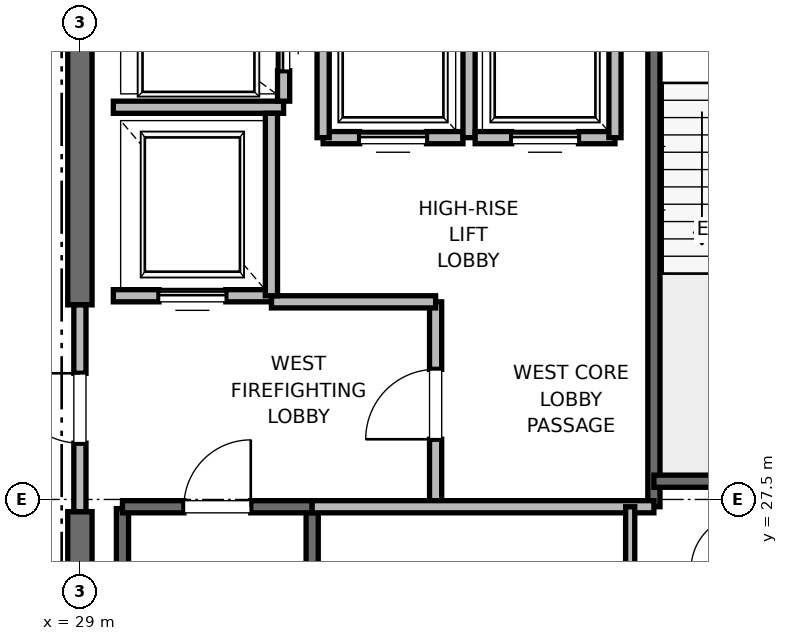
"""IFC4 building model, lengths in metres.
Left out: names, types, materials, properties, quantities, classifications, styles, units other than length and angle.
Written with IfcOpenShell. Run it as: python <this file> out.ifc"""

import sys

from ifc_helpers import new_model, si_unit, direction, frame, frame_2d, origin, place, context, subcontext, project, spatial, rectangle, extrude, element, fill, save


model = new_model("IFC4")
c1 = context("Model", 3, precision=1e-05, world=origin(), true_north=direction((0.0, 1.0)))
c2 = subcontext(c1, "Body", "Model", "MODEL_VIEW")
j1 = project(units=[si_unit("LENGTHUNIT", "METRE"), si_unit("PLANEANGLEUNIT", "RADIAN")], contexts=[c1])
p1 = place(None, origin())
s1 = spatial("IfcSite", under=j1, at=p1, CompositionType="ELEMENT")
p2 = place(p1, origin())
s2 = spatial("IfcBuilding", under=s1, at=p2, CompositionType="ELEMENT")
p3 = place(p2, frame((0.0, 0.0, 314.8)))
s3 = spatial("IfcBuildingStorey", under=s2, at=p3, CompositionType="ELEMENT", Elevation=314.8)
p4 = place(p3, frame((29.0, 18.5, 0.0), z_axis=(0.0, 0.0, 1.0), x_axis=(0.0, 1.0, 0.0)))
e1 = element("IfcWall", 1, at=p4, inside=s3, PredefinedType="SHEAR", context=c2, shape_type="SweptSolid", body=[
    extrude(rectangle(XDim=8.8, YDim=0.4, at=frame_2d((4.4, 0.0))), origin(), (0.0, 0.0, 1.0), 3.785),
])
p5 = place(p3, frame((29.0, 30.7, 0.0), z_axis=(0.0, 0.0, 1.0), x_axis=(0.0, 1.0, 0.0)))
e2 = element("IfcWall", 2, at=p5, inside=s3, PredefinedType="SHEAR", context=c2, shape_type="SweptSolid", body=[
    extrude(rectangle(XDim=5.8, YDim=0.4, at=frame_2d((2.9, 0.0))), origin(), (0.0, 0.0, 1.0), 3.785),
])
p6 = place(p3, frame((29.7, 19.2, 0.0), z_axis=(0.0, 0.0, 1.0), x_axis=(0.0, 1.0, 0.0)))
e3 = element("IfcWall", 3, at=p6, inside=s3, PredefinedType="SOLIDWALL", context=c2, shape_type="SweptSolid", body=[
    extrude(rectangle(XDim=8.15, YDim=0.2, at=frame_2d((4.075, 0.0))), origin(), (0.0, 0.0, 1.0), 3.785),
])
p7 = place(p3, frame((32.82, 18.6, 0.0), z_axis=(0.0, 0.0, 1.0), x_axis=(0.0, 1.0, 0.0)))
e4 = element("IfcWall", 4, at=p7, inside=s3, PredefinedType="SOLIDWALL", context=c2, shape_type="SweptSolid", body=[
    extrude(rectangle(XDim=8.78, YDim=0.2, at=frame_2d((4.39, 0.0))), origin(), (0.0, 0.0, 1.0), 3.785),
])
p8 = place(p3, frame((29.7, 27.38, 0.0), z_axis=(0.0, 0.0, 1.0), x_axis=(1.0, 0.0, 0.0)))
e5 = element("IfcWall", 5, at=p8, inside=s3, PredefinedType="SOLIDWALL", context=c2, shape_type="SweptSolid", body=[
    extrude(rectangle(XDim=3.12, YDim=0.2, at=frame_2d((1.56, 0.0))), origin(), (0.0, 0.0, 1.0), 3.785),
])
p9 = place(p8, frame((1.01, 0.0, 0.0)))
e6 = element("IfcOpeningElement", 6, at=p9, cuts=e5, PredefinedType="OPENING", context=c2, shape_type="SweptSolid", body=[
    extrude(rectangle(XDim=1.1, YDim=2.15, at=frame_2d((0.55, 1.075))), frame((0.0, 0.1, 0.0), z_axis=(0.0, -1.0, 0.0), x_axis=(1.0, 0.0, 0.0)), (0.0, 0.0, 1.0), 0.2),
])
p10 = place(p3, frame((38.44, 27.38, 0.0), z_axis=(0.0, 0.0, 1.0), x_axis=(0.0, 1.0, 0.0)))
e7 = element("IfcWall", 7, at=p10, inside=s3, PredefinedType="SOLIDWALL", context=c2, shape_type="SweptSolid", body=[
    extrude(rectangle(XDim=8.87, YDim=0.2, at=frame_2d((4.435, 0.0))), origin(), (0.0, 0.0, 1.0), 3.785),
])
p11 = place(p3, frame((38.44, 27.8, 0.0), z_axis=(0.0, 0.0, 1.0), x_axis=(1.0, 0.0, 0.0)))
e8 = element("IfcWall", 8, at=p11, inside=s3, PredefinedType="SOLIDWALL", context=c2, shape_type="SweptSolid", body=[
    extrude(rectangle(XDim=3.32, YDim=0.2, at=frame_2d((1.66, 0.0))), origin(), (0.0, 0.0, 1.0), 3.785),
])
p12 = place(p3, frame((34.85, 27.38, 0.0), z_axis=(0.0, 0.0, 1.0), x_axis=(0.0, 1.0, 0.0)))
e9 = element("IfcWall", 9, at=p12, inside=s3, PredefinedType="PARTITIONING", context=c2, shape_type="SweptSolid", body=[
    extrude(rectangle(XDim=3.37, YDim=0.2, at=frame_2d((1.685, 0.0))), origin(), (0.0, 0.0, 1.0), 3.785),
])
p13 = place(p12, frame((1.11, 0.0, 0.0)))
e10 = element("IfcOpeningElement", 10, at=p13, cuts=e9, PredefinedType="OPENING", context=c2, shape_type="SweptSolid", body=[
    extrude(rectangle(XDim=1.15, YDim=2.2, at=frame_2d((0.575, 1.1))), frame((0.0, 0.1, 0.0), z_axis=(0.0, -1.0, 0.0), x_axis=(1.0, 0.0, 0.0)), (0.0, 0.0, 1.0), 0.2),
])
p14 = place(p3, frame((29.0, 27.3, 0.0), z_axis=(0.0, 0.0, 1.0), x_axis=(0.0, 1.0, 0.0)))
e11 = element("IfcWall", 11, at=p14, inside=s3, PredefinedType="PARTITIONING", context=c2, shape_type="SweptSolid", body=[
    extrude(rectangle(XDim=3.4, YDim=0.2, at=frame_2d((1.7, 0.0))), origin(), (0.0, 0.0, 1.0), 2.865),
])
p15 = place(p14, frame((1.125, 0.0, 0.0)))
e12 = element("IfcOpeningElement", 12, at=p15, cuts=e11, PredefinedType="OPENING", context=c2, shape_type="SweptSolid", body=[
    extrude(rectangle(XDim=1.15, YDim=2.2, at=frame_2d((0.575, 1.1))), frame((0.0, 0.1, 0.0), z_axis=(0.0, -1.0, 0.0), x_axis=(1.0, 0.0, 0.0)), (0.0, 0.0, 1.0), 0.2),
])
p16 = place(p3, frame((32.82, 27.38, 0.0), z_axis=(0.0, 0.0, 1.0), x_axis=(1.0, 0.0, 0.0)))
e13 = element("IfcWall", 13, at=p16, inside=s3, PredefinedType="PARTITIONING", context=c2, shape_type="SweptSolid", body=[
    extrude(rectangle(XDim=5.62, YDim=0.2, at=frame_2d((2.81, 0.0))), origin(), (0.0, 0.0, 1.0), 3.785),
])
p17 = place(p3, frame((32.15, 30.75, 0.0), z_axis=(0.0, 0.0, 1.0), x_axis=(1.0, 0.0, 0.0)))
e14 = element("IfcWall", 14, at=p17, inside=s3, PredefinedType="PARTITIONING", context=c2, shape_type="SweptSolid", body=[
    extrude(rectangle(XDim=2.7, YDim=0.2, at=frame_2d((1.35, 0.0))), origin(), (0.0, 0.0, 1.0), 3.785),
])
p18 = place(p3, frame((29.55, 30.85, 0.0), z_axis=(0.0, 0.0, 1.0), x_axis=(1.0, 0.0, 0.0)))
e15 = element("IfcWall", 15, at=p18, inside=s3, PredefinedType="SOLIDWALL", context=c2, shape_type="SweptSolid", body=[
    extrude(rectangle(XDim=2.6, YDim=0.2, at=frame_2d((1.3, 0.0))), origin(), (0.0, 0.0, 1.0), 2.865),
])
p19 = place(p18, frame((0.75, 0.0, 0.0)))
e16 = element("IfcOpeningElement", 16, at=p19, cuts=e15, PredefinedType="OPENING", context=c2, shape_type="SweptSolid", body=[
    extrude(rectangle(XDim=1.1, YDim=2.2, at=frame_2d((0.55, 1.1))), frame((0.0, 0.1, 0.0), z_axis=(0.0, -1.0, 0.0), x_axis=(1.0, 0.0, 0.0)), (0.0, 0.0, 1.0), 0.2),
])
p20 = place(p3, frame((29.55, 33.95, 0.0), z_axis=(0.0, 0.0, 1.0), x_axis=(1.0, 0.0, 0.0)))
e17 = element("IfcWall", 17, at=p20, inside=s3, PredefinedType="SOLIDWALL", context=c2, shape_type="SweptSolid", body=[
    extrude(rectangle(XDim=2.8, YDim=0.2, at=frame_2d((1.4, 0.0))), origin(), (0.0, 0.0, 1.0), 3.785),
])
p21 = place(p3, frame((32.15, 30.85, 0.0), z_axis=(0.0, 0.0, 1.0), x_axis=(0.0, 1.0, 0.0)))
e18 = element("IfcWall", 18, at=p21, inside=s3, PredefinedType="SOLIDWALL", context=c2, shape_type="SweptSolid", body=[
    extrude(rectangle(XDim=3.0, YDim=0.2, at=frame_2d((1.5, 0.0))), origin(), (0.0, 0.0, 1.0), 3.785),
])
p22 = place(p3, frame((32.35, 34.05, 0.0), z_axis=(0.0, 0.0, 1.0), x_axis=(0.0, 1.0, 0.0)))
e19 = element("IfcWall", 19, at=p22, inside=s3, PredefinedType="SOLIDWALL", context=c2, shape_type="SweptSolid", body=[
    extrude(rectangle(XDim=2.1, YDim=0.2, at=frame_2d((1.05, 0.0))), origin(), (0.0, 0.0, 1.0), 3.785),
])
p23 = place(p22, frame((0.5, 0.0, 0.0)))
e20 = element("IfcOpeningElement", 20, at=p23, cuts=e19, PredefinedType="OPENING", context=c2, shape_type="SweptSolid", body=[
    extrude(rectangle(XDim=1.1, YDim=2.2, at=frame_2d((0.55, 1.1))), frame((0.0, 0.1, 0.0), z_axis=(0.0, -1.0, 0.0), x_axis=(1.0, 0.0, 0.0)), (0.0, 0.0, 1.0), 0.2),
])
p24 = place(p3, frame((33.0, 33.45, 0.0), z_axis=(0.0, 0.0, 1.0), x_axis=(1.0, 0.0, 0.0)))
e21 = element("IfcWall", 21, at=p24, inside=s3, PredefinedType="SOLIDWALL", context=c2, shape_type="SweptSolid", body=[
    extrude(rectangle(XDim=2.3, YDim=0.2, at=frame_2d((1.15, 0.0))), origin(), (0.0, 0.0, 1.0), 3.785),
])
p25 = place(p24, frame((0.6, 0.0, 0.0)))
e22 = element("IfcOpeningElement", 22, at=p25, cuts=e21, PredefinedType="OPENING", context=c2, shape_type="SweptSolid", body=[
    extrude(rectangle(XDim=1.1, YDim=2.2, at=frame_2d((0.55, 1.1))), frame((0.0, 0.1, 0.0), z_axis=(0.0, -1.0, 0.0), x_axis=(1.0, 0.0, 0.0)), (0.0, 0.0, 1.0), 0.2),
])
p26 = place(p3, frame((33.0, 36.05, 0.0), z_axis=(0.0, 0.0, 1.0), x_axis=(0.0, -1.0, 0.0)))
e23 = element("IfcWall", 23, at=p26, inside=s3, PredefinedType="SOLIDWALL", context=c2, shape_type="SweptSolid", body=[
    extrude(rectangle(XDim=2.6, YDim=0.2, at=frame_2d((1.3, 0.0))), origin(), (0.0, 0.0, 1.0), 3.785),
])
p27 = place(p3, frame((35.4, 33.45, 0.0), z_axis=(0.0, 0.0, 1.0), x_axis=(0.0, 1.0, 0.0)))
e24 = element("IfcWall", 24, at=p27, inside=s3, PredefinedType="SOLIDWALL", context=c2, shape_type="SweptSolid", body=[
    extrude(rectangle(XDim=2.6, YDim=0.2, at=frame_2d((1.3, 0.0))), origin(), (0.0, 0.0, 1.0), 2.865),
])
p28 = place(p3, frame((35.5, 33.45, 0.0), z_axis=(0.0, 0.0, 1.0), x_axis=(1.0, 0.0, 0.0)))
e25 = element("IfcWall", 25, at=p28, inside=s3, PredefinedType="SOLIDWALL", context=c2, shape_type="SweptSolid", body=[
    extrude(rectangle(XDim=2.3, YDim=0.2, at=frame_2d((1.15, 0.0))), origin(), (0.0, 0.0, 1.0), 3.785),
])
p29 = place(p28, frame((0.6, 0.0, 0.0)))
e26 = element("IfcOpeningElement", 26, at=p29, cuts=e25, PredefinedType="OPENING", context=c2, shape_type="SweptSolid", body=[
    extrude(rectangle(XDim=1.1, YDim=2.2, at=frame_2d((0.55, 1.1))), frame((0.0, 0.1, 0.0), z_axis=(0.0, -1.0, 0.0), x_axis=(1.0, 0.0, 0.0)), (0.0, 0.0, 1.0), 0.2),
])
p30 = place(p3, frame((37.8, 33.45, 0.0), z_axis=(0.0, 0.0, 1.0), x_axis=(0.0, 1.0, 0.0)))
e27 = element("IfcWall", 27, at=p30, inside=s3, PredefinedType="SOLIDWALL", context=c2, shape_type="SweptSolid", body=[
    extrude(rectangle(XDim=2.6, YDim=0.2, at=frame_2d((1.3, 0.0))), origin(), (0.0, 0.0, 1.0), 2.865),
])
p31 = place(p3, frame((38.05, 23.06, 0.0), z_axis=(0.0, 0.0, 1.0), x_axis=(0.0, 1.0, 0.0)))
e28 = element("IfcWall", 28, at=p31, inside=s3, PredefinedType="PARTITIONING", context=c2, shape_type="SweptSolid", body=[
    extrude(rectangle(XDim=4.32, YDim=0.15, at=frame_2d((2.16, 0.0))), origin(), (0.0, 0.0, 1.0), 2.85),
])
p32 = place(p31, frame((1.66, 0.0, 0.0)))
e29 = element("IfcOpeningElement", 29, at=p32, cuts=e28, PredefinedType="OPENING", context=c2, shape_type="SweptSolid", body=[
    extrude(rectangle(XDim=1.0, YDim=2.15, at=frame_2d((0.5, 1.075))), frame((0.0, 0.075, 0.0), z_axis=(0.0, -1.0, 0.0), x_axis=(1.0, 0.0, 0.0)), (0.0, 0.0, 1.0), 0.15),
])
p33 = place(p9, origin())
e30 = element("IfcDoor", 30, at=p33, inside=s3, OperationType="SINGLE_SWING_RIGHT", PredefinedType="DOOR", context=c2, shape_type="SweptSolid", body=[
    extrude(rectangle(XDim=1.1, YDim=2.15, at=frame_2d((0.55, 1.075))), frame((0.0, 0.025, 0.0), z_axis=(0.0, -1.0, 0.0), x_axis=(1.0, 0.0, 0.0)), (0.0, 0.0, 1.0), 0.05),
])
fill(e6, e30)
p34 = place(p13, origin())
e31 = element("IfcDoor", 31, at=p34, inside=s3, OperationType="SINGLE_SWING_LEFT", PredefinedType="DOOR", context=c2, shape_type="SweptSolid", body=[
    extrude(rectangle(XDim=1.15, YDim=2.2, at=frame_2d((0.575, 1.1))), frame((0.0, 0.025, 0.0), z_axis=(0.0, -1.0, 0.0), x_axis=(1.0, 0.0, 0.0)), (0.0, 0.0, 1.0), 0.05),
])
fill(e10, e31)
p35 = place(p15, origin())
e32 = element("IfcDoor", 32, at=p35, inside=s3, OperationType="SINGLE_SWING_RIGHT", PredefinedType="DOOR", context=c2, shape_type="SweptSolid", body=[
    extrude(rectangle(XDim=1.15, YDim=2.2, at=frame_2d((0.575, 1.1))), frame((0.0, 0.025, 0.0), z_axis=(0.0, -1.0, 0.0), x_axis=(1.0, 0.0, 0.0)), (0.0, 0.0, 1.0), 0.05),
])
fill(e12, e32)
p36 = place(p19, origin())
e33 = element("IfcDoor", 33, at=p36, inside=s3, OperationType="SLIDING_TO_RIGHT", PredefinedType="DOOR", context=c2, shape_type="SweptSolid", body=[
    extrude(rectangle(XDim=1.1, YDim=2.2, at=frame_2d((0.55, 1.1))), frame((0.0, 0.025, 0.0), z_axis=(0.0, -1.0, 0.0), x_axis=(1.0, 0.0, 0.0)), (0.0, 0.0, 1.0), 0.05),
])
fill(e16, e33)
p37 = place(p23, origin())
e34 = element("IfcDoor", 34, at=p37, inside=s3, OperationType="SLIDING_TO_RIGHT", PredefinedType="DOOR", context=c2, shape_type="SweptSolid", body=[
    extrude(rectangle(XDim=1.1, YDim=2.2, at=frame_2d((0.55, 1.1))), frame((0.0, 0.025, 0.0), z_axis=(0.0, -1.0, 0.0), x_axis=(1.0, 0.0, 0.0)), (0.0, 0.0, 1.0), 0.05),
])
fill(e20, e34)
p38 = place(p25, origin())
e35 = element("IfcDoor", 35, at=p38, inside=s3, OperationType="SLIDING_TO_RIGHT", PredefinedType="DOOR", context=c2, shape_type="SweptSolid", body=[
    extrude(rectangle(XDim=1.1, YDim=2.2, at=frame_2d((0.55, 1.1))), frame((0.0, 0.025, 0.0), z_axis=(0.0, -1.0, 0.0), x_axis=(1.0, 0.0, 0.0)), (0.0, 0.0, 1.0), 0.05),
])
fill(e22, e35)
p39 = place(p29, origin())
e36 = element("IfcDoor", 36, at=p39, inside=s3, OperationType="SLIDING_TO_RIGHT", PredefinedType="DOOR", context=c2, shape_type="SweptSolid", body=[
    extrude(rectangle(XDim=1.1, YDim=2.2, at=frame_2d((0.55, 1.1))), frame((0.0, 0.025, 0.0), z_axis=(0.0, -1.0, 0.0), x_axis=(1.0, 0.0, 0.0)), (0.0, 0.0, 1.0), 0.05),
])
fill(e26, e36)
save(model, sys.argv[1])
